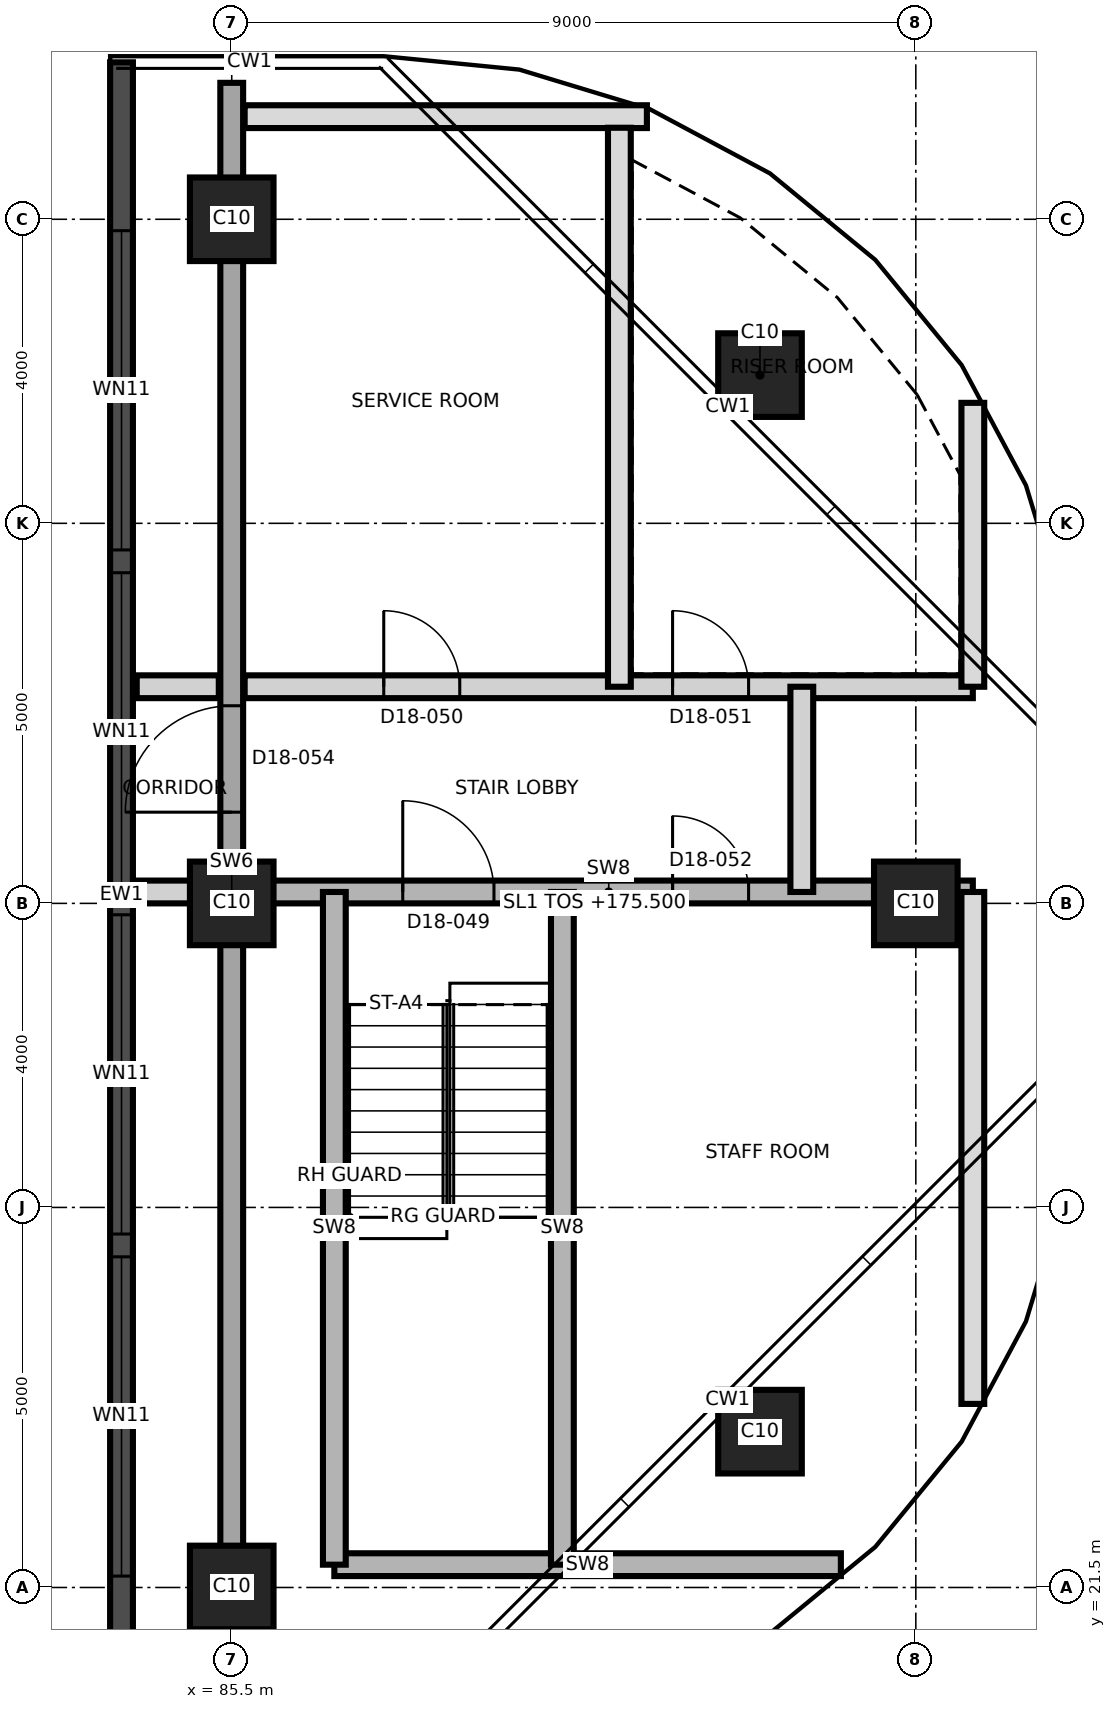
"""IFC4 building model, lengths in metres.
Left out: names, types, materials, properties, quantities, classifications, styles, units other than length and angle.
Written with IfcOpenShell. Run it as: python <this file> out.ifc"""

import sys

from ifc_helpers import new_model, si_unit, direction, frame, frame_2d, origin, origin_2d, place, context, subcontext, project, spatial, rectangle, extrude, element, fill, save


model = new_model("IFC4")
c1 = context("Model", 3, precision=1e-05, world=origin(), true_north=direction((0.0, 1.0)))
c2 = subcontext(c1, "Body", "Model", "MODEL_VIEW")
j1 = project(units=[si_unit("LENGTHUNIT", "METRE"), si_unit("PLANEANGLEUNIT", "RADIAN")], contexts=[c1])
p1 = place(None, origin())
s1 = spatial("IfcSite", under=j1, at=p1, CompositionType="ELEMENT")
p2 = place(p1, origin())
s2 = spatial("IfcBuilding", under=s1, at=p2, CompositionType="ELEMENT")
p3 = place(p2, frame((0.0, 0.0, 175.5)))
s3 = spatial("IfcBuildingStorey", under=s2, at=p3, CompositionType="ELEMENT", Elevation=175.5)
for number, where, z_axis, x_axis in (
    (1, (85.5, 21.5, 0.0), (0.0, 0.0, 1.0), (1.0, 0.0, 0.0)),
    (2, (92.45, 23.55, 0.0), (0.0, 0.0, 1.0), (1.0, 0.0, 0.0)),
    (3, (85.5, 30.5, 0.0), (0.0, 0.0, 1.0), (1.0, 0.0, 0.0)),
    (4, (94.5, 30.5, 0.0), (0.0, 0.0, 1.0), (1.0, 0.0, 0.0)),
    (5, (92.45, 37.45, 0.0), (0.0, 0.0, 1.0), (1.0, 0.0, 0.0)),
    (6, (85.5, 39.5, 0.0), (0.0, 0.0, 1.0), (1.0, 0.0, 0.0)),
):
    element("IfcColumn", number, at=place(p3, frame(where, z_axis=z_axis, x_axis=x_axis)), inside=s3, PredefinedType="COLUMN", context=c2, shape_type="SweptSolid", body=[
        extrude(rectangle(XDim=1.1, YDim=1.1, at=origin_2d()), origin(), (0.0, 0.0, 1.0), 3.7),
    ])
p4 = place(p3, frame((85.5, 19.705, 0.0), z_axis=(0.0, 0.0, 1.0), x_axis=(0.0, 1.0, 0.0)))
e7 = element("IfcWall", 7, at=p4, inside=s3, PredefinedType="SHEAR", context=c2, shape_type="SweptSolid", body=[
    extrude(rectangle(XDim=21.59, YDim=0.3, at=frame_2d((10.795, 0.0))), origin(), (0.0, 0.0, 1.0), 3.7),
])
p5 = place(p4, frame((11.995, 0.0, 0.0)))
e8 = element("IfcOpeningElement", 8, at=p5, cuts=e7, PredefinedType="OPENING", context=c2, shape_type="SweptSolid", body=[
    extrude(rectangle(XDim=1.4, YDim=2.1, at=frame_2d((0.7, 1.05))), frame((0.0, 0.16, 0.0), z_axis=(0.0, -1.0, 0.0), x_axis=(1.0, 0.0, 0.0)), (0.0, 0.0, 1.0), 0.32),
])
p6 = place(p3, frame((84.05, 41.565, 0.0), z_axis=(0.0, 0.0, 1.0), x_axis=(0.0, -1.0, 0.0)))
e9 = element("IfcWall", 9, at=p6, inside=s3, PredefinedType="SOLIDWALL", context=c2, shape_type="SweptSolid", body=[
    extrude(rectangle(XDim=21.91, YDim=0.3, at=frame_2d((10.955, 0.0))), origin(), (0.0, 0.0, 1.0), 3.4),
])
p7 = place(p6, frame((2.215, 0.0, 0.9)))
e10 = element("IfcOpeningElement", 10, at=p7, cuts=e9, PredefinedType="OPENING", context=c2, shape_type="SweptSolid", body=[
    extrude(rectangle(XDim=4.2, YDim=1.5, at=frame_2d((2.1, 0.75))), frame((0.0, 0.16, 0.0), z_axis=(0.0, -1.0, 0.0), x_axis=(1.0, 0.0, 0.0)), (0.0, 0.0, 1.0), 0.32),
])
p8 = place(p6, frame((6.715, 0.0, 0.9)))
e11 = element("IfcOpeningElement", 11, at=p8, cuts=e9, PredefinedType="OPENING", context=c2, shape_type="SweptSolid", body=[
    extrude(rectangle(XDim=4.2, YDim=1.5, at=frame_2d((2.1, 0.75))), frame((0.0, 0.16, 0.0), z_axis=(0.0, -1.0, 0.0), x_axis=(1.0, 0.0, 0.0)), (0.0, 0.0, 1.0), 0.32),
])
p9 = place(p6, frame((11.215, 0.0, 0.9)))
e12 = element("IfcOpeningElement", 12, at=p9, cuts=e9, PredefinedType="OPENING", context=c2, shape_type="SweptSolid", body=[
    extrude(rectangle(XDim=4.2, YDim=1.5, at=frame_2d((2.1, 0.75))), frame((0.0, 0.16, 0.0), z_axis=(0.0, -1.0, 0.0), x_axis=(1.0, 0.0, 0.0)), (0.0, 0.0, 1.0), 0.32),
])
p10 = place(p6, frame((15.715, 0.0, 0.9)))
e13 = element("IfcOpeningElement", 13, at=p10, cuts=e9, PredefinedType="OPENING", context=c2, shape_type="SweptSolid", body=[
    extrude(rectangle(XDim=4.2, YDim=1.5, at=frame_2d((2.1, 0.75))), frame((0.0, 0.16, 0.0), z_axis=(0.0, -1.0, 0.0), x_axis=(1.0, 0.0, 0.0)), (0.0, 0.0, 1.0), 0.32),
])
p11 = place(p3, frame((86.85, 21.8, 0.0), z_axis=(0.0, 0.0, 1.0), x_axis=(1.0, 0.0, 0.0)))
e14 = element("IfcWall", 14, at=p11, inside=s3, PredefinedType="SHEAR", context=c2, shape_type="SweptSolid", body=[
    extrude(rectangle(XDim=6.664, YDim=0.3, at=frame_2d((3.332, 0.0))), origin(), (0.0, 0.0, 1.0), 3.4),
])
p12 = place(p3, frame((84.25, 30.65, 0.0), z_axis=(0.0, 0.0, 1.0), x_axis=(1.0, 0.0, 0.0)))
e15 = element("IfcWall", 15, at=p12, inside=s3, PredefinedType="PARTITIONING", context=c2, shape_type="SweptSolid", body=[
    extrude(rectangle(XDim=1.08, YDim=0.3, at=frame_2d((0.54, 0.0))), origin(), (0.0, 0.0, 1.0), 2.8),
])
p13 = place(p3, frame((85.67, 30.65, 0.0), z_axis=(0.0, 0.0, 1.0), x_axis=(1.0, 0.0, 0.0)))
e16 = element("IfcWall", 16, at=p13, inside=s3, PredefinedType="SHEAR", context=c2, shape_type="SweptSolid", body=[
    extrude(rectangle(XDim=9.58, YDim=0.3, at=frame_2d((4.79, 0.0))), origin(), (0.0, 0.0, 1.0), 3.4),
])
p14 = place(p13, frame((2.08, 0.0, 0.0)))
e17 = element("IfcOpeningElement", 17, at=p14, cuts=e16, PredefinedType="OPENING", context=c2, shape_type="SweptSolid", body=[
    extrude(rectangle(XDim=1.2, YDim=2.1, at=frame_2d((0.6, 1.05))), frame((0.0, 0.16, 0.0), z_axis=(0.0, -1.0, 0.0), x_axis=(1.0, 0.0, 0.0)), (0.0, 0.0, 1.0), 0.32),
])
p15 = place(p13, frame((5.63, 0.0, 0.0)))
e18 = element("IfcOpeningElement", 18, at=p15, cuts=e16, PredefinedType="OPENING", context=c2, shape_type="SweptSolid", body=[
    extrude(rectangle(XDim=1.0, YDim=2.1, at=frame_2d((0.5, 1.05))), frame((0.0, 0.16, 0.0), z_axis=(0.0, -1.0, 0.0), x_axis=(1.0, 0.0, 0.0)), (0.0, 0.0, 1.0), 0.32),
])
p16 = place(p3, frame((84.25, 33.35, 0.0), z_axis=(0.0, 0.0, 1.0), x_axis=(1.0, 0.0, 0.0)))
e19 = element("IfcWall", 19, at=p16, inside=s3, PredefinedType="PARTITIONING", context=c2, shape_type="SweptSolid", body=[
    extrude(rectangle(XDim=1.08, YDim=0.3, at=frame_2d((0.54, 0.0))), origin(), (0.0, 0.0, 1.0), 3.4),
])
p17 = place(p3, frame((85.67, 33.35, 0.0), z_axis=(0.0, 0.0, 1.0), x_axis=(1.0, 0.0, 0.0)))
e20 = element("IfcWall", 20, at=p17, inside=s3, PredefinedType="PARTITIONING", context=c2, shape_type="SweptSolid", body=[
    extrude(rectangle(XDim=9.58, YDim=0.3, at=frame_2d((4.79, 0.0))), origin(), (0.0, 0.0, 1.0), 3.4),
])
p18 = place(p17, frame((1.83, 0.0, 0.0)))
e21 = element("IfcOpeningElement", 21, at=p18, cuts=e20, PredefinedType="OPENING", context=c2, shape_type="SweptSolid", body=[
    extrude(rectangle(XDim=1.0, YDim=2.1, at=frame_2d((0.5, 1.05))), frame((0.0, 0.16, 0.0), z_axis=(0.0, -1.0, 0.0), x_axis=(1.0, 0.0, 0.0)), (0.0, 0.0, 1.0), 0.32),
])
p19 = place(p17, frame((5.63, 0.0, 0.0)))
e22 = element("IfcOpeningElement", 22, at=p19, cuts=e20, PredefinedType="OPENING", context=c2, shape_type="SweptSolid", body=[
    extrude(rectangle(XDim=1.0, YDim=2.1, at=frame_2d((0.5, 1.05))), frame((0.0, 0.16, 0.0), z_axis=(0.0, -1.0, 0.0), x_axis=(1.0, 0.0, 0.0)), (0.0, 0.0, 1.0), 0.32),
])
p20 = place(p3, frame((85.67, 40.85, 0.0), z_axis=(0.0, 0.0, 1.0), x_axis=(1.0, 0.0, 0.0)))
e23 = element("IfcWall", 23, at=p20, inside=s3, PredefinedType="PARTITIONING", context=c2, shape_type="SweptSolid", body=[
    extrude(rectangle(XDim=5.292, YDim=0.3, at=frame_2d((2.646, 0.0))), origin(), (0.0, 0.0, 1.0), 3.4),
])
for number, where, z_axis, x_axis in (
    (24, (86.85, 21.8, 0.0), (0.0, 0.0, 1.0), (0.0, 1.0, 0.0)),
    (25, (89.85, 21.8, 0.0), (0.0, 0.0, 1.0), (0.0, 1.0, 0.0)),
):
    element("IfcWall", number, at=place(p3, frame(where, z_axis=z_axis, x_axis=x_axis)), inside=s3, PredefinedType="SHEAR", context=c2, shape_type="SweptSolid", body=[
        extrude(rectangle(XDim=8.85, YDim=0.3, at=frame_2d((4.425, 0.0))), origin(), (0.0, 0.0, 1.0), 3.4),
    ])
p21 = place(p3, frame((90.6, 33.35, 0.0), z_axis=(0.0, 0.0, 1.0), x_axis=(0.0, 1.0, 0.0)))
e26 = element("IfcWall", 26, at=p21, inside=s3, PredefinedType="PARTITIONING", context=c2, shape_type="SweptSolid", body=[
    extrude(rectangle(XDim=7.354, YDim=0.3, at=frame_2d((3.677, 0.0))), origin(), (0.0, 0.0, 1.0), 3.4),
])
p22 = place(p3, frame((93.0, 30.65, 0.0), z_axis=(0.0, 0.0, 1.0), x_axis=(0.0, 1.0, 0.0)))
e27 = element("IfcWall", 27, at=p22, inside=s3, PredefinedType="PARTITIONING", context=c2, shape_type="SweptSolid", body=[
    extrude(rectangle(XDim=2.7, YDim=0.3, at=frame_2d((1.35, 0.0))), origin(), (0.0, 0.0, 1.0), 3.4),
])
p23 = place(p3, frame((95.25, 23.915, 0.0), z_axis=(0.0, 0.0, 1.0), x_axis=(0.0, 1.0, 0.0)))
e28 = element("IfcWall", 28, at=p23, inside=s3, PredefinedType="PARTITIONING", context=c2, shape_type="SweptSolid", body=[
    extrude(rectangle(XDim=6.735, YDim=0.3, at=frame_2d((3.367, 0.0))), origin(), (0.0, 0.0, 1.0), 3.4),
])
p24 = place(p3, frame((95.25, 33.35, 0.0), z_axis=(0.0, 0.0, 1.0), x_axis=(0.0, 1.0, 0.0)))
e29 = element("IfcWall", 29, at=p24, inside=s3, PredefinedType="PARTITIONING", context=c2, shape_type="SweptSolid", body=[
    extrude(rectangle(XDim=3.735, YDim=0.3, at=frame_2d((1.867, 0.0))), origin(), (0.0, 0.0, 1.0), 3.4),
])
p25 = place(p7, origin())
e30 = element("IfcWindow", 30, at=p25, inside=s3, PartitioningType="SINGLE_PANEL", PredefinedType="WINDOW", context=c2, shape_type="SweptSolid", body=[
    extrude(rectangle(XDim=4.2, YDim=1.5, at=frame_2d((2.1, 0.75))), frame((0.0, 0.03, 0.0), z_axis=(0.0, -1.0, 0.0), x_axis=(1.0, 0.0, 0.0)), (0.0, 0.0, 1.0), 0.06),
])
fill(e10, e30)
p26 = place(p8, origin())
e31 = element("IfcWindow", 31, at=p26, inside=s3, PartitioningType="SINGLE_PANEL", PredefinedType="WINDOW", context=c2, shape_type="SweptSolid", body=[
    extrude(rectangle(XDim=4.2, YDim=1.5, at=frame_2d((2.1, 0.75))), frame((0.0, 0.03, 0.0), z_axis=(0.0, -1.0, 0.0), x_axis=(1.0, 0.0, 0.0)), (0.0, 0.0, 1.0), 0.06),
])
fill(e11, e31)
p27 = place(p9, origin())
e32 = element("IfcWindow", 32, at=p27, inside=s3, PartitioningType="SINGLE_PANEL", PredefinedType="WINDOW", context=c2, shape_type="SweptSolid", body=[
    extrude(rectangle(XDim=4.2, YDim=1.5, at=frame_2d((2.1, 0.75))), frame((0.0, 0.03, 0.0), z_axis=(0.0, -1.0, 0.0), x_axis=(1.0, 0.0, 0.0)), (0.0, 0.0, 1.0), 0.06),
])
fill(e12, e32)
p28 = place(p10, origin())
e33 = element("IfcWindow", 33, at=p28, inside=s3, PartitioningType="SINGLE_PANEL", PredefinedType="WINDOW", context=c2, shape_type="SweptSolid", body=[
    extrude(rectangle(XDim=4.2, YDim=1.5, at=frame_2d((2.1, 0.75))), frame((0.0, 0.03, 0.0), z_axis=(0.0, -1.0, 0.0), x_axis=(1.0, 0.0, 0.0)), (0.0, 0.0, 1.0), 0.06),
])
fill(e13, e33)
p29 = place(p14, origin())
e34 = element("IfcDoor", 34, at=p29, inside=s3, OperationType="SINGLE_SWING_LEFT", PredefinedType="DOOR", context=c2, shape_type="SweptSolid", body=[
    extrude(rectangle(XDim=1.2, YDim=2.1, at=frame_2d((0.6, 1.05))), frame((0.0, 0.025, 0.0), z_axis=(0.0, -1.0, 0.0), x_axis=(1.0, 0.0, 0.0)), (0.0, 0.0, 1.0), 0.05),
])
fill(e17, e34)
p30 = place(p18, origin())
e35 = element("IfcDoor", 35, at=p30, inside=s3, OperationType="SINGLE_SWING_LEFT", PredefinedType="DOOR", context=c2, shape_type="SweptSolid", body=[
    extrude(rectangle(XDim=1.0, YDim=2.1, at=frame_2d((0.5, 1.05))), frame((0.0, 0.025, 0.0), z_axis=(0.0, -1.0, 0.0), x_axis=(1.0, 0.0, 0.0)), (0.0, 0.0, 1.0), 0.05),
])
fill(e21, e35)
p31 = place(p19, origin())
e36 = element("IfcDoor", 36, at=p31, inside=s3, OperationType="SINGLE_SWING_RIGHT", PredefinedType="DOOR", context=c2, shape_type="SweptSolid", body=[
    extrude(rectangle(XDim=1.0, YDim=2.1, at=frame_2d((0.5, 1.05))), frame((0.0, 0.025, 0.0), z_axis=(0.0, -1.0, 0.0), x_axis=(1.0, 0.0, 0.0)), (0.0, 0.0, 1.0), 0.05),
])
fill(e22, e36)
p32 = place(p15, origin())
e37 = element("IfcDoor", 37, at=p32, inside=s3, OperationType="SINGLE_SWING_LEFT", PredefinedType="DOOR", context=c2, shape_type="SweptSolid", body=[
    extrude(rectangle(XDim=1.0, YDim=2.1, at=frame_2d((0.5, 1.05))), frame((0.0, 0.025, 0.0), z_axis=(0.0, -1.0, 0.0), x_axis=(1.0, 0.0, 0.0)), (0.0, 0.0, 1.0), 0.05),
])
fill(e18, e37)
p33 = place(p5, origin())
e38 = element("IfcDoor", 38, at=p33, inside=s3, OperationType="SINGLE_SWING_RIGHT", PredefinedType="DOOR", context=c2, shape_type="SweptSolid", body=[
    extrude(rectangle(XDim=1.4, YDim=2.1, at=frame_2d((0.7, 1.05))), frame((0.0, 0.025, 0.0), z_axis=(0.0, -1.0, 0.0), x_axis=(1.0, 0.0, 0.0)), (0.0, 0.0, 1.0), 0.05),
])
fill(e8, e38)
save(model, sys.argv[1])
